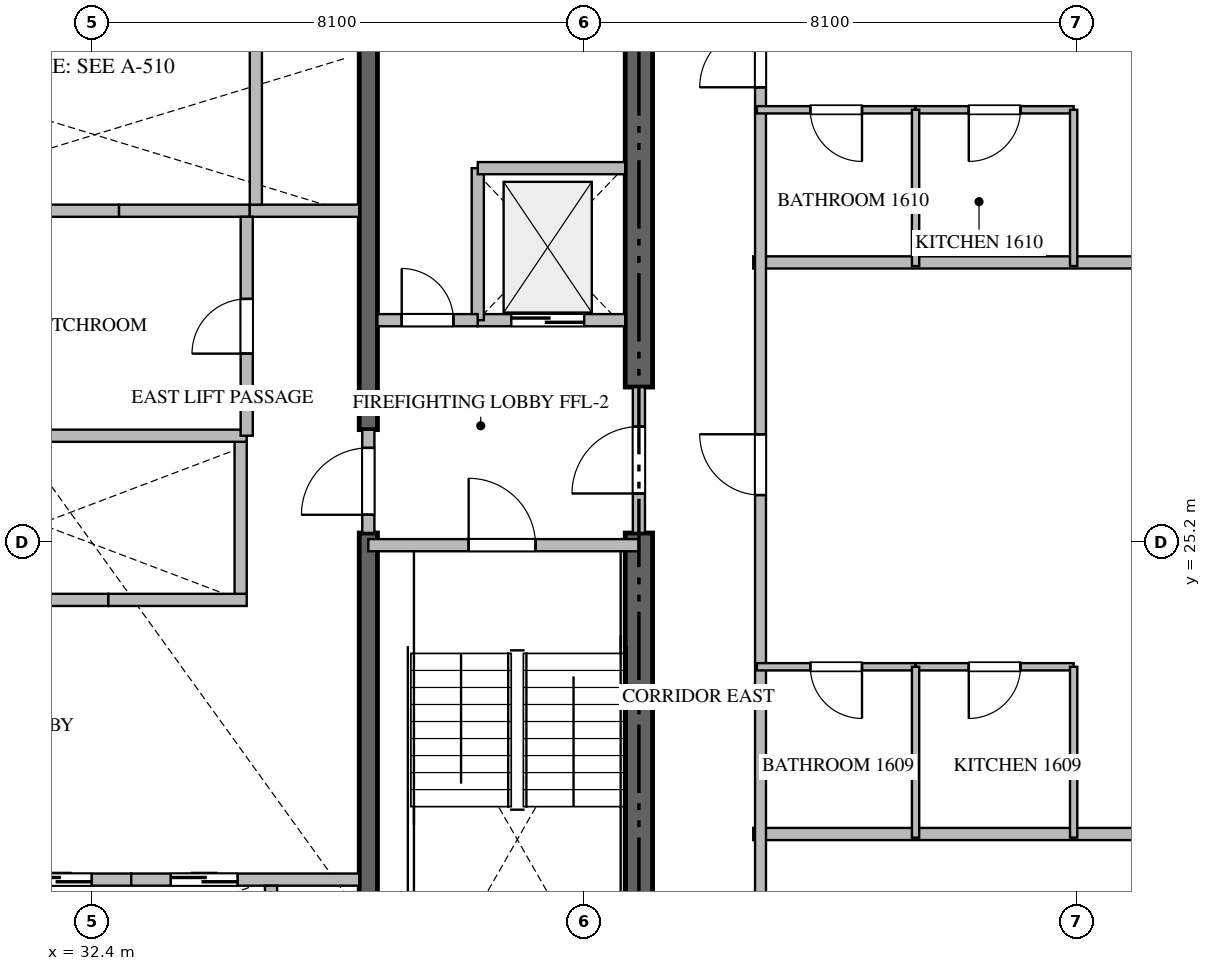
"""IFC4 building model, lengths in metres.
Left out: names, types, materials, properties, quantities, classifications, styles, units other than length and angle.
Written with IfcOpenShell. Run it as: python <this file> out.ifc"""

import sys

from ifc_helpers import new_model, si_unit, direction, frame, frame_2d, origin, place, context, subcontext, project, spatial, rectangle, extrude, source, transform, mapped, element, fill, save


model = new_model("IFC4")
c1 = context("Model", 3, precision=1e-05, world=origin(), true_north=direction((0.0, 1.0)))
c2 = subcontext(c1, "Body", "Model", "MODEL_VIEW")
j1 = project(units=[si_unit("LENGTHUNIT", "METRE"), si_unit("PLANEANGLEUNIT", "RADIAN")], contexts=[c1])
p1 = place(None, origin())
s1 = spatial("IfcSite", under=j1, at=p1, CompositionType="ELEMENT")
p2 = place(p1, origin())
s2 = spatial("IfcBuilding", under=s1, at=p2, CompositionType="ELEMENT")
p3 = place(p2, frame((0.0, 0.0, 67.95)))
s3 = spatial("IfcBuildingStorey", under=s2, at=p3, CompositionType="ELEMENT", Elevation=67.95)
p4 = place(p3, frame((41.4, 17.025, -0.26), z_axis=(0.0, 0.0, 1.0), x_axis=(0.0, 1.0, 0.0)))
e1 = element("IfcWall", 1, at=p4, inside=s3, PredefinedType="SHEAR", context=c2, shape_type="SweptSolid", body=[
    extrude(rectangle(XDim=8.325, YDim=0.45, at=frame_2d((4.163, 0.0))), origin(), (0.0, 0.0, 1.0), 3.748),
])
p5 = place(p3, frame((41.4, 27.75, -0.26), z_axis=(0.0, 0.0, 1.0), x_axis=(0.0, 1.0, 0.0)))
e2 = element("IfcWall", 2, at=p5, inside=s3, PredefinedType="SHEAR", context=c2, shape_type="SweptSolid", body=[
    extrude(rectangle(XDim=5.625, YDim=0.45, at=frame_2d((2.812, 0.0))), origin(), (0.0, 0.0, 1.0), 3.748),
])
p6 = place(p3, frame((36.95, 17.025, -0.26), z_axis=(0.0, 0.0, 1.0), x_axis=(0.0, 1.0, 0.0)))
e3 = element("IfcWall", 3, at=p6, inside=s3, PredefinedType="SHEAR", context=c2, shape_type="SweptSolid", body=[
    extrude(rectangle(XDim=8.325, YDim=0.3, at=frame_2d((4.163, 0.0))), origin(), (0.0, 0.0, 1.0), 3.748),
])
p7 = place(p3, frame((36.95, 27.05, -0.26), z_axis=(0.0, 0.0, 1.0), x_axis=(0.0, 1.0, 0.0)))
e4 = element("IfcWall", 4, at=p7, inside=s3, PredefinedType="SHEAR", context=c2, shape_type="SweptSolid", body=[
    extrude(rectangle(XDim=6.325, YDim=0.3, at=frame_2d((3.163, 0.0))), origin(), (0.0, 0.0, 1.0), 3.748),
])
p8 = place(p3, frame((36.95, 25.15, 0.0), z_axis=(0.0, 0.0, 1.0), x_axis=(1.0, 0.0, 0.0)))
e5 = element("IfcWall", 5, at=p8, inside=s3, PredefinedType="STANDARD", context=c2, shape_type="SweptSolid", body=[
    extrude(rectangle(XDim=4.45, YDim=0.2, at=frame_2d((2.225, 0.0))), origin(), (0.0, 0.0, 1.0), 3.49),
])
p9 = place(p8, frame((1.65, 0.0, 0.0)))
e6 = element("IfcOpeningElement", 6, at=p9, cuts=e5, PredefinedType="OPENING", context=c2, shape_type="SweptSolid", body=[
    extrude(rectangle(XDim=1.1, YDim=2.15, at=frame_2d((0.55, 1.075))), frame((0.0, 0.11, 0.0), z_axis=(0.0, -1.0, 0.0), x_axis=(1.0, 0.0, 0.0)), (0.0, 0.0, 1.0), 0.22),
])
p10 = place(p3, frame((38.75, 28.85, 0.0), z_axis=(0.0, 0.0, 1.0), x_axis=(1.0, 0.0, 0.0)))
e7 = element("IfcWall", 7, at=p10, inside=s3, PredefinedType="STANDARD", context=c2, shape_type="SweptSolid", body=[
    extrude(rectangle(XDim=2.425, YDim=0.2, at=frame_2d((1.212, 0.0))), origin(), (0.0, 0.0, 1.0), 3.49),
])
p11 = place(p10, frame((0.55, 0.0, 0.0)))
e8 = element("IfcOpeningElement", 8, at=p11, cuts=e7, PredefinedType="OPENING", context=c2, shape_type="SweptSolid", body=[
    extrude(rectangle(XDim=1.2, YDim=2.2, at=frame_2d((0.6, 1.1))), frame((0.0, 0.11, 0.0), z_axis=(0.0, -1.0, 0.0), x_axis=(1.0, 0.0, 0.0)), (0.0, 0.0, 1.0), 0.22),
])
p12 = place(p3, frame((30.65, 19.65, 0.0), z_axis=(0.0, 0.0, 1.0), x_axis=(1.0, 0.0, 0.0)))
e9 = element("IfcWall", 9, at=p12, inside=s3, PredefinedType="STANDARD", context=c2, shape_type="SweptSolid", body=[
    extrude(rectangle(XDim=2.4, YDim=0.2, at=frame_2d((1.2, 0.0))), origin(), (0.0, 0.0, 1.0), 3.49),
])
p13 = place(p12, frame((0.65, 0.0, 0.0)))
e10 = element("IfcOpeningElement", 10, at=p13, cuts=e9, PredefinedType="OPENING", context=c2, shape_type="SweptSolid", body=[
    extrude(rectangle(XDim=1.1, YDim=2.2, at=frame_2d((0.55, 1.1))), frame((0.0, 0.11, 0.0), z_axis=(0.0, -1.0, 0.0), x_axis=(1.0, 0.0, 0.0)), (0.0, 0.0, 1.0), 0.22),
])
p14 = place(p3, frame((33.05, 19.65, 0.0), z_axis=(0.0, 0.0, 1.0), x_axis=(1.0, 0.0, 0.0)))
e11 = element("IfcWall", 11, at=p14, inside=s3, PredefinedType="STANDARD", context=c2, shape_type="SweptSolid", body=[
    extrude(rectangle(XDim=3.75, YDim=0.2, at=frame_2d((1.875, 0.0))), origin(), (0.0, 0.0, 1.0), 3.49),
])
p15 = place(p14, frame((0.65, 0.0, 0.0)))
e12 = element("IfcOpeningElement", 12, at=p15, cuts=e11, PredefinedType="OPENING", context=c2, shape_type="SweptSolid", body=[
    extrude(rectangle(XDim=1.1, YDim=2.2, at=frame_2d((0.55, 1.1))), frame((0.0, 0.11, 0.0), z_axis=(0.0, -1.0, 0.0), x_axis=(1.0, 0.0, 0.0)), (0.0, 0.0, 1.0), 0.22),
])
p16 = place(p3, frame((35.35, 17.025, 0.0), z_axis=(0.0, 0.0, 1.0), x_axis=(0.0, 1.0, 0.0)))
e13 = element("IfcWall", 13, at=p16, inside=s3, PredefinedType="STANDARD", context=c2, shape_type="SweptSolid", body=[
    extrude(rectangle(XDim=2.525, YDim=0.2, at=frame_2d((1.263, 0.0))), origin(), (0.0, 0.0, 1.0), 3.49),
])
p17 = place(p3, frame((30.425, 24.25, 0.0), z_axis=(0.0, 0.0, 1.0), x_axis=(1.0, 0.0, 0.0)))
e14 = element("IfcWall", 14, at=p17, inside=s3, PredefinedType="STANDARD", context=c2, shape_type="SweptSolid", body=[
    extrude(rectangle(XDim=2.25, YDim=0.2, at=frame_2d((1.125, 0.0))), origin(), (0.0, 0.0, 1.0), 3.49),
])
p18 = place(p3, frame((32.675, 24.25, 0.0), z_axis=(0.0, 0.0, 1.0), x_axis=(1.0, 0.0, 0.0)))
e15 = element("IfcWall", 15, at=p18, inside=s3, PredefinedType="STANDARD", context=c2, shape_type="SweptSolid", body=[
    extrude(rectangle(XDim=2.275, YDim=0.2, at=frame_2d((1.137, 0.0))), origin(), (0.0, 0.0, 1.0), 3.49),
])
p19 = place(p3, frame((34.85, 24.35, 0.0), z_axis=(0.0, 0.0, 1.0), x_axis=(0.0, 1.0, 0.0)))
e16 = element("IfcWall", 16, at=p19, inside=s3, PredefinedType="STANDARD", context=c2, shape_type="SweptSolid", body=[
    extrude(rectangle(XDim=2.5, YDim=0.2, at=frame_2d((1.25, 0.0))), origin(), (0.0, 0.0, 1.0), 3.49),
])
p20 = place(p3, frame((30.55, 30.65, 0.0), z_axis=(0.0, 0.0, 1.0), x_axis=(1.0, 0.0, 0.0)))
e17 = element("IfcWall", 17, at=p20, inside=s3, PredefinedType="STANDARD", context=c2, shape_type="SweptSolid", body=[
    extrude(rectangle(XDim=2.3, YDim=0.2, at=frame_2d((1.15, 0.0))), origin(), (0.0, 0.0, 1.0), 3.49),
])
p21 = place(p3, frame((32.85, 30.65, 0.0), z_axis=(0.0, 0.0, 1.0), x_axis=(1.0, 0.0, 0.0)))
e18 = element("IfcWall", 18, at=p21, inside=s3, PredefinedType="STANDARD", context=c2, shape_type="SweptSolid", body=[
    extrude(rectangle(XDim=2.15, YDim=0.2, at=frame_2d((1.075, 0.0))), origin(), (0.0, 0.0, 1.0), 3.49),
])
p22 = place(p3, frame((35.0, 30.65, 0.0), z_axis=(0.0, 0.0, 1.0), x_axis=(1.0, 0.0, 0.0)))
e19 = element("IfcWall", 19, at=p22, inside=s3, PredefinedType="STANDARD", context=c2, shape_type="SweptSolid", body=[
    extrude(rectangle(XDim=1.8, YDim=0.2, at=frame_2d((0.9, 0.0))), origin(), (0.0, 0.0, 1.0), 3.49),
])
p23 = place(p3, frame((35.1, 30.75, 0.0), z_axis=(0.0, 0.0, 1.0), x_axis=(0.0, 1.0, 0.0)))
e20 = element("IfcWall", 20, at=p23, inside=s3, PredefinedType="STANDARD", context=c2, shape_type="SweptSolid", body=[
    extrude(rectangle(XDim=2.625, YDim=0.2, at=frame_2d((1.312, 0.0))), origin(), (0.0, 0.0, 1.0), 3.49),
])
p24 = place(p3, frame((38.75, 28.85, 0.0), z_axis=(0.0, 0.0, 1.0), x_axis=(0.0, 1.0, 0.0)))
e21 = element("IfcWall", 21, at=p24, inside=s3, PredefinedType="STANDARD", context=c2, shape_type="SweptSolid", body=[
    extrude(rectangle(XDim=2.5, YDim=0.2, at=frame_2d((1.25, 0.0))), origin(), (0.0, 0.0, 1.0), 3.49),
])
p25 = place(p3, frame((38.75, 31.35, 0.0), z_axis=(0.0, 0.0, 1.0), x_axis=(1.0, 0.0, 0.0)))
e22 = element("IfcWall", 22, at=p25, inside=s3, PredefinedType="STANDARD", context=c2, shape_type="SweptSolid", body=[
    extrude(rectangle(XDim=2.425, YDim=0.2, at=frame_2d((1.212, 0.0))), origin(), (0.0, 0.0, 1.0), 3.49),
])
p26 = place(p3, frame((37.1, 28.85, 0.0), z_axis=(0.0, 0.0, 1.0), x_axis=(1.0, 0.0, 0.0)))
e23 = element("IfcWall", 23, at=p26, inside=s3, PredefinedType="STANDARD", context=c2, shape_type="SweptSolid", body=[
    extrude(rectangle(XDim=1.648, YDim=0.2, at=frame_2d((0.824, 0.0))), origin(), (0.0, 0.0, 1.0), 3.49),
])
p27 = place(p26, frame((0.399, 0.0, 0.0)))
e24 = element("IfcOpeningElement", 24, at=p27, cuts=e23, PredefinedType="OPENING", context=c2, shape_type="SweptSolid", body=[
    extrude(rectangle(XDim=0.85, YDim=2.1, at=frame_2d((0.425, 1.05))), frame((0.0, 0.11, 0.0), z_axis=(0.0, -1.0, 0.0), x_axis=(1.0, 0.0, 0.0)), (0.0, 0.0, 1.0), 0.22),
])
p28 = place(p3, frame((41.4, 25.352, 0.0), z_axis=(0.0, 0.0, 1.0), x_axis=(0.0, 1.0, 0.0)))
e25 = element("IfcWall", 25, at=p28, inside=s3, PredefinedType="STANDARD", context=c2, shape_type="SweptSolid", body=[
    extrude(rectangle(XDim=2.396, YDim=0.2, at=frame_2d((1.198, 0.0))), origin(), (0.0, 0.0, 1.0), 3.49),
])
p29 = place(p28, frame((0.648, 0.0, 0.0)))
e26 = element("IfcOpeningElement", 26, at=p29, cuts=e25, PredefinedType="OPENING", context=c2, shape_type="SweptSolid", body=[
    extrude(rectangle(XDim=1.1, YDim=2.15, at=frame_2d((0.55, 1.075))), frame((0.0, 0.11, 0.0), z_axis=(0.0, -1.0, 0.0), x_axis=(1.0, 0.0, 0.0)), (0.0, 0.0, 1.0), 0.22),
])
p30 = place(p3, frame((36.95, 25.352, 0.0), z_axis=(0.0, 0.0, 1.0), x_axis=(0.0, 1.0, 0.0)))
e27 = element("IfcWall", 27, at=p30, inside=s3, PredefinedType="STANDARD", context=c2, shape_type="SweptSolid", body=[
    extrude(rectangle(XDim=1.696, YDim=0.2, at=frame_2d((0.848, 0.0))), origin(), (0.0, 0.0, 1.0), 3.49),
])
p31 = place(p30, frame((0.298, 0.0, 0.0)))
e28 = element("IfcOpeningElement", 28, at=p31, cuts=e27, PredefinedType="OPENING", context=c2, shape_type="SweptSolid", body=[
    extrude(rectangle(XDim=1.1, YDim=2.15, at=frame_2d((0.55, 1.075))), frame((0.0, 0.11, 0.0), z_axis=(0.0, -1.0, 0.0), x_axis=(1.0, 0.0, 0.0)), (0.0, 0.0, 1.0), 0.22),
])
p32 = place(p3, frame((28.0, 26.95, 0.0), z_axis=(0.0, 0.0, 1.0), x_axis=(1.0, 0.0, 0.0)))
e29 = element("IfcWall", 29, at=p32, inside=s3, PredefinedType="STANDARD", context=c2, shape_type="SweptSolid", body=[
    extrude(rectangle(XDim=6.95, YDim=0.2, at=frame_2d((3.475, 0.0))), origin(), (0.0, 0.0, 1.0), 3.49),
])
p33 = place(p3, frame((34.95, 26.95, 0.0), z_axis=(0.0, 0.0, 1.0), x_axis=(0.0, 1.0, 0.0)))
e30 = element("IfcWall", 30, at=p33, inside=s3, PredefinedType="STANDARD", context=c2, shape_type="SweptSolid", body=[
    extrude(rectangle(XDim=3.6, YDim=0.2, at=frame_2d((1.8, 0.0))), origin(), (0.0, 0.0, 1.0), 3.49),
])
p34 = place(p33, frame((1.35, 0.0, 0.0)))
e31 = element("IfcOpeningElement", 31, at=p34, cuts=e30, PredefinedType="OPENING", context=c2, shape_type="SweptSolid", body=[
    extrude(rectangle(XDim=0.9, YDim=2.1, at=frame_2d((0.45, 1.05))), frame((0.0, 0.11, 0.0), z_axis=(0.0, -1.0, 0.0), x_axis=(1.0, 0.0, 0.0)), (0.0, 0.0, 1.0), 0.22),
])
for number, where, z_axis, x_axis in (
    (32, (43.28, 20.4, 0.0), (0.0, 0.0, 1.0), (1.0, 0.0, 0.0)),
    (33, (43.28, 29.8, 0.0), (0.0, 0.0, 1.0), (1.0, 0.0, 0.0)),
):
    element("IfcWall", number, at=place(p3, frame(where, z_axis=z_axis, x_axis=x_axis)), inside=s3, PredefinedType="PARTITIONING", context=c2, shape_type="SweptSolid", body=[
        extrude(rectangle(XDim=15.438, YDim=0.2, at=frame_2d((7.719, 0.0))), origin(), (0.0, 0.0, 1.0), 3.49),
    ])
p35 = place(p3, frame((43.4, 14.9, 0.0), z_axis=(0.0, 0.0, 1.0), x_axis=(0.0, 1.0, 0.0)))
e34 = element("IfcWall", 34, at=p35, inside=s3, PredefinedType="PARTITIONING", context=c2, shape_type="SweptSolid", body=[
    extrude(rectangle(XDim=20.6, YDim=0.18, at=frame_2d((10.3, 0.0))), origin(), (0.0, 0.0, 1.0), 3.49),
])
p36 = place(p35, frame((3.469, 0.0, 0.0)))
e35 = element("IfcOpeningElement", 35, at=p36, cuts=e34, PredefinedType="OPENING", context=c2, shape_type="SweptSolid", body=[
    extrude(rectangle(XDim=1.0, YDim=2.15, at=frame_2d((0.5, 1.075))), frame((0.0, 0.1, 0.0), z_axis=(0.0, -1.0, 0.0), x_axis=(1.0, 0.0, 0.0)), (0.0, 0.0, 1.0), 0.2),
])
p37 = place(p35, frame((11.074, 0.0, 0.0)))
e36 = element("IfcOpeningElement", 36, at=p37, cuts=e34, PredefinedType="OPENING", context=c2, shape_type="SweptSolid", body=[
    extrude(rectangle(XDim=1.0, YDim=2.15, at=frame_2d((0.5, 1.075))), frame((0.0, 0.1, 0.0), z_axis=(0.0, -1.0, 0.0), x_axis=(1.0, 0.0, 0.0)), (0.0, 0.0, 1.0), 0.2),
])
p38 = place(p35, frame((17.78, 0.0, 0.0)))
e37 = element("IfcOpeningElement", 37, at=p38, cuts=e34, PredefinedType="OPENING", context=c2, shape_type="SweptSolid", body=[
    extrude(rectangle(XDim=1.0, YDim=2.15, at=frame_2d((0.5, 1.075))), frame((0.0, 0.1, 0.0), z_axis=(0.0, -1.0, 0.0), x_axis=(1.0, 0.0, 0.0)), (0.0, 0.0, 1.0), 0.2),
])
p39 = place(p3, frame((48.55, 23.15, 0.0), z_axis=(0.0, 0.0, 1.0), x_axis=(-1.0, 0.0, 0.0)))
e38 = element("IfcWall", 38, at=p39, inside=s3, PredefinedType="PARTITIONING", context=c2, shape_type="SweptSolid", body=[
    extrude(rectangle(XDim=2.6, YDim=0.12, at=frame_2d((1.3, 0.0))), origin(), (0.0, 0.0, 1.0), 3.49),
])
p40 = place(p39, frame((0.875, 0.0, 0.0)))
e39 = element("IfcOpeningElement", 39, at=p40, cuts=e38, PredefinedType="OPENING", context=c2, shape_type="SweptSolid", body=[
    extrude(rectangle(XDim=0.85, YDim=2.1, at=frame_2d((0.425, 1.05))), frame((0.0, 0.07, 0.0), z_axis=(0.0, -1.0, 0.0), x_axis=(1.0, 0.0, 0.0)), (0.0, 0.0, 1.0), 0.14),
])
p41 = place(p3, frame((45.948, 23.15, 0.0), z_axis=(0.0, 0.0, 1.0), x_axis=(-1.0, 0.0, 0.0)))
e40 = element("IfcWall", 40, at=p41, inside=s3, PredefinedType="PARTITIONING", context=c2, shape_type="SweptSolid", body=[
    extrude(rectangle(XDim=2.608, YDim=0.12, at=frame_2d((1.304, 0.0))), origin(), (0.0, 0.0, 1.0), 3.49),
])
p42 = place(p41, frame((0.879, 0.0, 0.0)))
e41 = element("IfcOpeningElement", 41, at=p42, cuts=e40, PredefinedType="OPENING", context=c2, shape_type="SweptSolid", body=[
    extrude(rectangle(XDim=0.85, YDim=2.1, at=frame_2d((0.425, 1.05))), frame((0.0, 0.07, 0.0), z_axis=(0.0, -1.0, 0.0), x_axis=(1.0, 0.0, 0.0)), (0.0, 0.0, 1.0), 0.14),
])
for number, where, z_axis, x_axis in (
    (42, (45.95, 20.34, 0.0), (0.0, 0.0, 1.0), (0.0, 1.0, 0.0)),
    (43, (48.55, 20.34, 0.0), (0.0, 0.0, 1.0), (0.0, 1.0, 0.0)),
):
    element("IfcWall", number, at=place(p3, frame(where, z_axis=z_axis, x_axis=x_axis)), inside=s3, PredefinedType="PARTITIONING", context=c2, shape_type="SweptSolid", body=[
        extrude(rectangle(XDim=2.81, YDim=0.12, at=frame_2d((1.405, 0.0))), origin(), (0.0, 0.0, 1.0), 3.49),
    ])
p43 = place(p3, frame((48.55, 32.31, 0.0), z_axis=(0.0, 0.0, 1.0), x_axis=(-1.0, 0.0, 0.0)))
e44 = element("IfcWall", 44, at=p43, inside=s3, PredefinedType="PARTITIONING", context=c2, shape_type="SweptSolid", body=[
    extrude(rectangle(XDim=2.6, YDim=0.12, at=frame_2d((1.3, 0.0))), origin(), (0.0, 0.0, 1.0), 3.49),
])
p44 = place(p43, frame((0.875, 0.0, 0.0)))
e45 = element("IfcOpeningElement", 45, at=p44, cuts=e44, PredefinedType="OPENING", context=c2, shape_type="SweptSolid", body=[
    extrude(rectangle(XDim=0.85, YDim=2.1, at=frame_2d((0.425, 1.05))), frame((0.0, 0.07, 0.0), z_axis=(0.0, -1.0, 0.0), x_axis=(1.0, 0.0, 0.0)), (0.0, 0.0, 1.0), 0.14),
])
p45 = place(p3, frame((45.948, 32.31, 0.0), z_axis=(0.0, 0.0, 1.0), x_axis=(-1.0, 0.0, 0.0)))
e46 = element("IfcWall", 46, at=p45, inside=s3, PredefinedType="PARTITIONING", context=c2, shape_type="SweptSolid", body=[
    extrude(rectangle(XDim=2.608, YDim=0.12, at=frame_2d((1.304, 0.0))), origin(), (0.0, 0.0, 1.0), 3.49),
])
p46 = place(p45, frame((0.879, 0.0, 0.0)))
e47 = element("IfcOpeningElement", 47, at=p46, cuts=e46, PredefinedType="OPENING", context=c2, shape_type="SweptSolid", body=[
    extrude(rectangle(XDim=0.85, YDim=2.1, at=frame_2d((0.425, 1.05))), frame((0.0, 0.07, 0.0), z_axis=(0.0, -1.0, 0.0), x_axis=(1.0, 0.0, 0.0)), (0.0, 0.0, 1.0), 0.14),
])
for number, where, z_axis, x_axis in (
    (48, (45.95, 29.74, 0.0), (0.0, 0.0, 1.0), (0.0, 1.0, 0.0)),
    (49, (48.55, 29.74, 0.0), (0.0, 0.0, 1.0), (0.0, 1.0, 0.0)),
):
    element("IfcWall", number, at=place(p3, frame(where, z_axis=z_axis, x_axis=x_axis)), inside=s3, PredefinedType="PARTITIONING", context=c2, shape_type="SweptSolid", body=[
        extrude(rectangle(XDim=2.57, YDim=0.12, at=frame_2d((1.285, 0.0))), origin(), (0.0, 0.0, 1.0), 3.49),
    ])
m1 = source(origin(), c2, "Body", "SweptSolid", [
    extrude(rectangle(XDim=1.1, YDim=2.15, at=frame_2d((0.55, 1.075))), frame((0.0, 0.025, 0.0), z_axis=(0.0, -1.0, 0.0), x_axis=(1.0, 0.0, 0.0)), (0.0, 0.0, 1.0), 0.05),
])
p47 = place(p9, origin())
e50 = element("IfcDoor", 50, at=p47, inside=s3, OperationType="SINGLE_SWING_LEFT", PredefinedType="DOOR", context=c2, shape_type="MappedRepresentation", body=[
    mapped(m1, transform((0.0, 0.0, 0.0), scale=1.0)),
])
fill(e6, e50)
m2 = source(origin(), c2, "Body", "SweptSolid", [
    extrude(rectangle(XDim=1.2, YDim=2.2, at=frame_2d((0.6, 1.1))), frame((0.0, 0.025, 0.0), z_axis=(0.0, -1.0, 0.0), x_axis=(1.0, 0.0, 0.0)), (0.0, 0.0, 1.0), 0.05),
])
p48 = place(p11, origin())
e51 = element("IfcDoor", 51, at=p48, inside=s3, OperationType="DOUBLE_DOOR_SLIDING", PredefinedType="DOOR", context=c2, shape_type="MappedRepresentation", body=[
    mapped(m2, transform((0.0, 0.0, 0.0), scale=1.0)),
])
fill(e8, e51)
m3 = source(origin(), c2, "Body", "SweptSolid", [
    extrude(rectangle(XDim=1.1, YDim=2.2, at=frame_2d((0.55, 1.1))), frame((0.0, 0.025, 0.0), z_axis=(0.0, -1.0, 0.0), x_axis=(1.0, 0.0, 0.0)), (0.0, 0.0, 1.0), 0.05),
])
p49 = place(p13, origin())
e52 = element("IfcDoor", 52, at=p49, inside=s3, OperationType="DOUBLE_DOOR_SLIDING", PredefinedType="DOOR", context=c2, shape_type="MappedRepresentation", body=[
    mapped(m3, transform((0.0, 0.0, 0.0), scale=1.0)),
])
fill(e10, e52)
p50 = place(p15, origin())
e53 = element("IfcDoor", 53, at=p50, inside=s3, OperationType="DOUBLE_DOOR_SLIDING", PredefinedType="DOOR", context=c2, shape_type="MappedRepresentation", body=[
    mapped(m3, transform((0.0, 0.0, 0.0), scale=1.0)),
])
fill(e12, e53)
m4 = source(origin(), c2, "Body", "SweptSolid", [
    extrude(rectangle(XDim=0.85, YDim=2.1, at=frame_2d((0.425, 1.05))), frame((0.0, 0.025, 0.0), z_axis=(0.0, -1.0, 0.0), x_axis=(1.0, 0.0, 0.0)), (0.0, 0.0, 1.0), 0.05),
])
p51 = place(p27, origin())
e54 = element("IfcDoor", 54, at=p51, inside=s3, OperationType="SINGLE_SWING_LEFT", PredefinedType="DOOR", context=c2, shape_type="MappedRepresentation", body=[
    mapped(m4, transform((0.0, 0.0, 0.0), scale=1.0)),
])
fill(e24, e54)
p52 = place(p29, origin())
e55 = element("IfcDoor", 55, at=p52, inside=s3, OperationType="SINGLE_SWING_LEFT", PredefinedType="DOOR", context=c2, shape_type="MappedRepresentation", body=[
    mapped(m1, transform((0.0, 0.0, 0.0), scale=1.0)),
])
fill(e26, e55)
p53 = place(p31, origin())
e56 = element("IfcDoor", 56, at=p53, inside=s3, OperationType="SINGLE_SWING_LEFT", PredefinedType="DOOR", context=c2, shape_type="MappedRepresentation", body=[
    mapped(m1, transform((0.0, 0.0, 0.0), scale=1.0)),
])
fill(e28, e56)
m5 = source(origin(), c2, "Body", "SweptSolid", [
    extrude(rectangle(XDim=0.9, YDim=2.1, at=frame_2d((0.45, 1.05))), frame((0.0, 0.025, 0.0), z_axis=(0.0, -1.0, 0.0), x_axis=(1.0, 0.0, 0.0)), (0.0, 0.0, 1.0), 0.05),
])
p54 = place(p34, origin())
e57 = element("IfcDoor", 57, at=p54, inside=s3, OperationType="SINGLE_SWING_LEFT", PredefinedType="DOOR", context=c2, shape_type="MappedRepresentation", body=[
    mapped(m5, transform((0.0, 0.0, 0.0), scale=1.0)),
])
fill(e31, e57)
m6 = source(origin(), c2, "Body", "SweptSolid", [
    extrude(rectangle(XDim=1.0, YDim=2.15, at=frame_2d((0.5, 1.075))), frame((0.0, 0.025, 0.0), z_axis=(0.0, -1.0, 0.0), x_axis=(1.0, 0.0, 0.0)), (0.0, 0.0, 1.0), 0.05),
])
p55 = place(p37, origin())
e58 = element("IfcDoor", 58, at=p55, inside=s3, OperationType="SINGLE_SWING_RIGHT", PredefinedType="DOOR", context=c2, shape_type="MappedRepresentation", body=[
    mapped(m6, transform((0.0, 0.0, 0.0), scale=1.0)),
])
fill(e36, e58)
p56 = place(p38, origin())
e59 = element("IfcDoor", 59, at=p56, inside=s3, OperationType="SINGLE_SWING_LEFT", PredefinedType="DOOR", context=c2, shape_type="MappedRepresentation", body=[
    mapped(m6, transform((0.0, 0.0, 0.0), scale=1.0)),
])
fill(e37, e59)
p57 = place(p40, origin())
e60 = element("IfcDoor", 60, at=p57, inside=s3, OperationType="SINGLE_SWING_RIGHT", PredefinedType="DOOR", context=c2, shape_type="MappedRepresentation", body=[
    mapped(m4, transform((0.0, 0.0, 0.0), scale=1.0)),
])
fill(e39, e60)
p58 = place(p42, origin())
e61 = element("IfcDoor", 61, at=p58, inside=s3, OperationType="SINGLE_SWING_LEFT", PredefinedType="DOOR", context=c2, shape_type="MappedRepresentation", body=[
    mapped(m4, transform((0.0, 0.0, 0.0), scale=1.0)),
])
fill(e41, e61)
p59 = place(p44, origin())
e62 = element("IfcDoor", 62, at=p59, inside=s3, OperationType="SINGLE_SWING_RIGHT", PredefinedType="DOOR", context=c2, shape_type="MappedRepresentation", body=[
    mapped(m4, transform((0.0, 0.0, 0.0), scale=1.0)),
])
fill(e45, e62)
p60 = place(p46, origin())
e63 = element("IfcDoor", 63, at=p60, inside=s3, OperationType="SINGLE_SWING_LEFT", PredefinedType="DOOR", context=c2, shape_type="MappedRepresentation", body=[
    mapped(m4, transform((0.0, 0.0, 0.0), scale=1.0)),
])
fill(e47, e63)
save(model, sys.argv[1])
